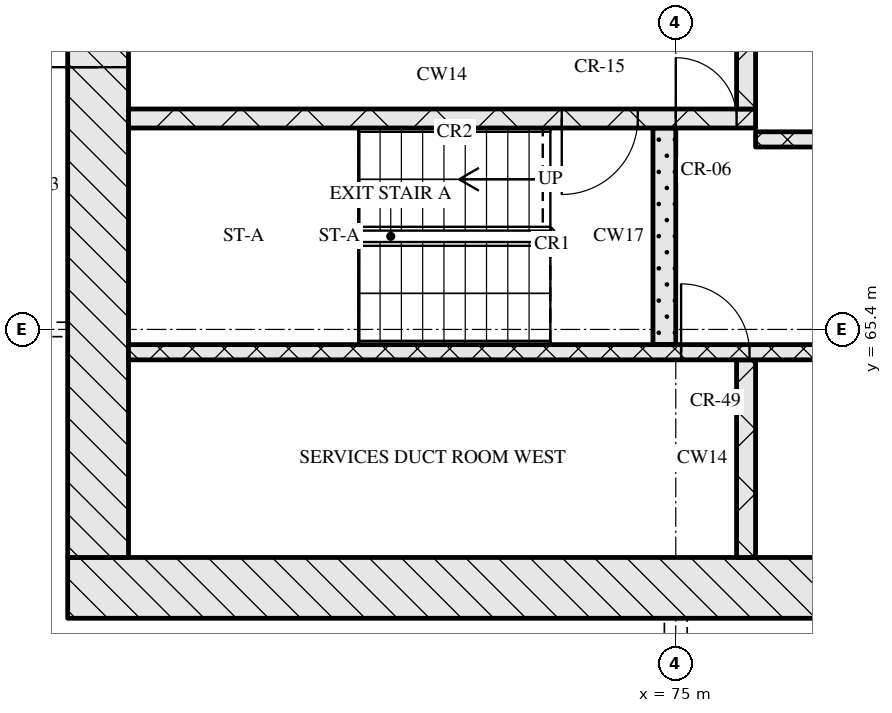
"""IFC4 building model, lengths in metres.
Left out: names, types, materials, properties, quantities, classifications, styles, units other than length and angle.
Written with IfcOpenShell. Run it as: python <this file> out.ifc"""

import sys

from ifc_helpers import new_model, si_unit, direction, frame, frame_2d, origin, place, context, subcontext, project, spatial, rectangle, extrude, element, fill, save


model = new_model("IFC4")
c1 = context("Model", 3, precision=1e-05, world=origin(), true_north=direction((0.0, 1.0)))
c2 = subcontext(c1, "Body", "Model", "MODEL_VIEW")
j1 = project(units=[si_unit("LENGTHUNIT", "METRE"), si_unit("PLANEANGLEUNIT", "RADIAN")], contexts=[c1])
p1 = place(None, origin())
s1 = spatial("IfcSite", under=j1, at=p1, CompositionType="ELEMENT")
p2 = place(p1, origin())
s2 = spatial("IfcBuilding", under=s1, at=p2, CompositionType="ELEMENT")
p3 = place(p2, frame((0.0, 0.0, 154.65)))
s3 = spatial("IfcBuildingStorey", under=s2, at=p3, CompositionType="ELEMENT", Elevation=154.65)
p4 = place(p3, frame((67.0, 62.0, 0.0), z_axis=(0.0, 0.0, 1.0), x_axis=(1.0, 0.0, 0.0)))
e1 = element("IfcWall", 1, at=p4, inside=s3, PredefinedType="SOLIDWALL", context=c2, shape_type="SweptSolid", body=[
    extrude(rectangle(XDim=41.2, YDim=0.8, at=frame_2d((20.6, 0.0))), origin(), (0.0, 0.0, 1.0), 3.32),
])
p5 = place(p4, frame((20.95, 0.0, 0.0)))
e2 = element("IfcOpeningElement", 2, at=p5, cuts=e1, PredefinedType="OPENING", context=c2, shape_type="SweptSolid", body=[
    extrude(rectangle(XDim=1.8, YDim=2.1, at=frame_2d((0.9, 1.05))), frame((0.0, 0.41, 0.0), z_axis=(0.0, -1.0, 0.0), x_axis=(1.0, 0.0, 0.0)), (0.0, 0.0, 1.0), 0.82),
])
p6 = place(p3, frame((67.4, 62.4, 0.0), z_axis=(0.0, 0.0, 1.0), x_axis=(0.0, 1.0, 0.0)))
e3 = element("IfcWall", 3, at=p6, inside=s3, PredefinedType="SOLIDWALL", context=c2, shape_type="SweptSolid", body=[
    extrude(rectangle(XDim=12.0, YDim=0.8, at=frame_2d((6.0, 0.0))), origin(), (0.0, 0.0, 1.0), 3.32),
])
p7 = place(p6, frame((6.45, 0.0, 0.0)))
e4 = element("IfcOpeningElement", 4, at=p7, cuts=e3, PredefinedType="OPENING", context=c2, shape_type="SweptSolid", body=[
    extrude(rectangle(XDim=1.2, YDim=2.1, at=frame_2d((0.6, 1.05))), frame((0.0, 0.41, 0.0), z_axis=(0.0, -1.0, 0.0), x_axis=(1.0, 0.0, 0.0)), (0.0, 0.0, 1.0), 0.82),
])
p8 = place(p3, frame((75.925, 62.4, 0.0), z_axis=(0.0, 0.0, 1.0), x_axis=(0.0, 1.0, 0.0)))
e5 = element("IfcWall", 5, at=p8, inside=s3, PredefinedType="SOLIDWALL", context=c2, shape_type="SweptSolid", body=[
    extrude(rectangle(XDim=2.6, YDim=0.25, at=frame_2d((1.3, 0.0))), origin(), (0.0, 0.0, 1.0), 3.32),
])
p9 = place(p3, frame((67.8, 65.1, 0.0), z_axis=(0.0, 0.0, 1.0), x_axis=(1.0, 0.0, 0.0)))
e6 = element("IfcWall", 6, at=p9, inside=s3, PredefinedType="SOLIDWALL", context=c2, shape_type="SweptSolid", body=[
    extrude(rectangle(XDim=18.5, YDim=0.2, at=frame_2d((9.25, 0.0))), origin(), (0.0, 0.0, 1.0), 3.32),
])
p10 = place(p9, frame((7.27, 0.0, 0.0)))
e7 = element("IfcOpeningElement", 7, at=p10, cuts=e6, PredefinedType="OPENING", context=c2, shape_type="SweptSolid", body=[
    extrude(rectangle(XDim=0.9, YDim=2.1, at=frame_2d((0.45, 1.05))), frame((0.0, 0.11, 0.0), z_axis=(0.0, -1.0, 0.0), x_axis=(1.0, 0.0, 0.0)), (0.0, 0.0, 1.0), 0.22),
])
p11 = place(p9, frame((11.45, 0.0, 0.0)))
e8 = element("IfcOpeningElement", 8, at=p11, cuts=e6, PredefinedType="OPENING", context=c2, shape_type="SweptSolid", body=[
    extrude(rectangle(XDim=0.9, YDim=2.1, at=frame_2d((0.45, 1.05))), frame((0.0, 0.11, 0.0), z_axis=(0.0, -1.0, 0.0), x_axis=(1.0, 0.0, 0.0)), (0.0, 0.0, 1.0), 0.22),
])
p12 = place(p9, frame((16.7, 0.0, 0.0)))
e9 = element("IfcOpeningElement", 9, at=p12, cuts=e6, PredefinedType="OPENING", context=c2, shape_type="SweptSolid", body=[
    extrude(rectangle(XDim=0.9, YDim=2.1, at=frame_2d((0.45, 1.05))), frame((0.0, 0.11, 0.0), z_axis=(0.0, -1.0, 0.0), x_axis=(1.0, 0.0, 0.0)), (0.0, 0.0, 1.0), 0.22),
])
p13 = place(p3, frame((74.85, 65.2, 0.0), z_axis=(0.0, 0.0, 1.0), x_axis=(0.0, 1.0, 0.0)))
e10 = element("IfcWall", 10, at=p13, inside=s3, PredefinedType="SOLIDWALL", context=c2, shape_type="SweptSolid", body=[
    extrude(rectangle(XDim=2.85, YDim=0.3, at=frame_2d((1.425, 0.0))), origin(), (0.0, 0.0, 1.0), 3.32),
])
p14 = place(p3, frame((76.05, 67.9, 0.0), z_axis=(0.0, 0.0, 1.0), x_axis=(1.0, 0.0, 0.0)))
e11 = element("IfcWall", 11, at=p14, inside=s3, PredefinedType="SOLIDWALL", context=c2, shape_type="SweptSolid", body=[
    extrude(rectangle(XDim=23.1, YDim=0.2, at=frame_2d((11.55, 0.0))), origin(), (0.0, 0.0, 1.0), 3.32),
])
p15 = place(p14, frame((1.4, 0.0, 0.0)))
e12 = element("IfcOpeningElement", 12, at=p15, cuts=e11, PredefinedType="OPENING", context=c2, shape_type="SweptSolid", body=[
    extrude(rectangle(XDim=0.9, YDim=2.1, at=frame_2d((0.45, 1.05))), frame((0.0, 0.11, 0.0), z_axis=(0.0, -1.0, 0.0), x_axis=(1.0, 0.0, 0.0)), (0.0, 0.0, 1.0), 0.22),
])
p16 = place(p14, frame((5.11, 0.0, 0.0)))
e13 = element("IfcOpeningElement", 13, at=p16, cuts=e11, PredefinedType="OPENING", context=c2, shape_type="SweptSolid", body=[
    extrude(rectangle(XDim=0.9, YDim=2.1, at=frame_2d((0.45, 1.05))), frame((0.0, 0.11, 0.0), z_axis=(0.0, -1.0, 0.0), x_axis=(1.0, 0.0, 0.0)), (0.0, 0.0, 1.0), 0.22),
])
p17 = place(p14, frame((8.45, 0.0, 0.0)))
e14 = element("IfcOpeningElement", 14, at=p17, cuts=e11, PredefinedType="OPENING", context=c2, shape_type="SweptSolid", body=[
    extrude(rectangle(XDim=0.9, YDim=2.1, at=frame_2d((0.45, 1.05))), frame((0.0, 0.11, 0.0), z_axis=(0.0, -1.0, 0.0), x_axis=(1.0, 0.0, 0.0)), (0.0, 0.0, 1.0), 0.22),
])
p18 = place(p14, frame((10.91, 0.0, 0.0)))
e15 = element("IfcOpeningElement", 15, at=p18, cuts=e11, PredefinedType="OPENING", context=c2, shape_type="SweptSolid", body=[
    extrude(rectangle(XDim=0.9, YDim=2.1, at=frame_2d((0.45, 1.05))), frame((0.0, 0.11, 0.0), z_axis=(0.0, -1.0, 0.0), x_axis=(1.0, 0.0, 0.0)), (0.0, 0.0, 1.0), 0.22),
])
p19 = place(p14, frame((13.55, 0.0, 0.0)))
e16 = element("IfcOpeningElement", 16, at=p19, cuts=e11, PredefinedType="OPENING", context=c2, shape_type="SweptSolid", body=[
    extrude(rectangle(XDim=1.0, YDim=2.1, at=frame_2d((0.5, 1.05))), frame((0.0, 0.11, 0.0), z_axis=(0.0, -1.0, 0.0), x_axis=(1.0, 0.0, 0.0)), (0.0, 0.0, 1.0), 0.22),
])
p20 = place(p14, frame((16.2, 0.0, 0.0)))
e17 = element("IfcOpeningElement", 17, at=p20, cuts=e11, PredefinedType="OPENING", context=c2, shape_type="SweptSolid", body=[
    extrude(rectangle(XDim=1.1, YDim=2.1, at=frame_2d((0.55, 1.05))), frame((0.0, 0.11, 0.0), z_axis=(0.0, -1.0, 0.0), x_axis=(1.0, 0.0, 0.0)), (0.0, 0.0, 1.0), 0.22),
])
p21 = place(p14, frame((18.7, 0.0, 0.0)))
e18 = element("IfcOpeningElement", 18, at=p21, cuts=e11, PredefinedType="OPENING", context=c2, shape_type="SweptSolid", body=[
    extrude(rectangle(XDim=1.1, YDim=2.1, at=frame_2d((0.55, 1.05))), frame((0.0, 0.11, 0.0), z_axis=(0.0, -1.0, 0.0), x_axis=(1.0, 0.0, 0.0)), (0.0, 0.0, 1.0), 0.22),
])
p22 = place(p14, frame((21.2, 0.0, 0.0)))
e19 = element("IfcOpeningElement", 19, at=p22, cuts=e11, PredefinedType="OPENING", context=c2, shape_type="SweptSolid", body=[
    extrude(rectangle(XDim=1.1, YDim=2.1, at=frame_2d((0.55, 1.05))), frame((0.0, 0.11, 0.0), z_axis=(0.0, -1.0, 0.0), x_axis=(1.0, 0.0, 0.0)), (0.0, 0.0, 1.0), 0.22),
])
p23 = place(p3, frame((67.8, 68.175, 0.0), z_axis=(0.0, 0.0, 1.0), x_axis=(1.0, 0.0, 0.0)))
e20 = element("IfcWall", 20, at=p23, inside=s3, PredefinedType="SOLIDWALL", context=c2, shape_type="SweptSolid", body=[
    extrude(rectangle(XDim=8.25, YDim=0.25, at=frame_2d((4.125, 0.0))), origin(), (0.0, 0.0, 1.0), 3.32),
])
p24 = place(p23, frame((5.7, 0.0, 0.0)))
e21 = element("IfcOpeningElement", 21, at=p24, cuts=e20, PredefinedType="OPENING", context=c2, shape_type="SweptSolid", body=[
    extrude(rectangle(XDim=1.0, YDim=2.1, at=frame_2d((0.5, 1.05))), frame((0.0, 0.135, 0.0), z_axis=(0.0, -1.0, 0.0), x_axis=(1.0, 0.0, 0.0)), (0.0, 0.0, 1.0), 0.27),
])
p25 = place(p23, frame((7.2, 0.0, 0.0)))
e22 = element("IfcOpeningElement", 22, at=p25, cuts=e20, PredefinedType="OPENING", context=c2, shape_type="SweptSolid", body=[
    extrude(rectangle(XDim=0.8, YDim=2.1, at=frame_2d((0.4, 1.05))), frame((0.0, 0.135, 0.0), z_axis=(0.0, -1.0, 0.0), x_axis=(1.0, 0.0, 0.0)), (0.0, 0.0, 1.0), 0.27),
])
p26 = place(p3, frame((75.925, 68.3, 0.0), z_axis=(0.0, 0.0, 1.0), x_axis=(0.0, 1.0, 0.0)))
e23 = element("IfcWall", 23, at=p26, inside=s3, PredefinedType="SOLIDWALL", context=c2, shape_type="SweptSolid", body=[
    extrude(rectangle(XDim=2.3, YDim=0.25, at=frame_2d((1.15, 0.0))), origin(), (0.0, 0.0, 1.0), 3.32),
])
p27 = place(p10, origin())
e24 = element("IfcDoor", 24, at=p27, inside=s3, OperationType="SINGLE_SWING_LEFT", PredefinedType="DOOR", context=c2, shape_type="SweptSolid", body=[
    extrude(rectangle(XDim=0.9, YDim=2.1, at=frame_2d((0.45, 1.05))), frame((0.0, 0.025, 0.0), z_axis=(0.0, -1.0, 0.0), x_axis=(1.0, 0.0, 0.0)), (0.0, 0.0, 1.0), 0.05),
])
fill(e7, e24)
p28 = place(p24, origin())
e25 = element("IfcDoor", 25, at=p28, inside=s3, OperationType="SINGLE_SWING_RIGHT", PredefinedType="DOOR", context=c2, shape_type="SweptSolid", body=[
    extrude(rectangle(XDim=1.0, YDim=2.1, at=frame_2d((0.5, 1.05))), frame((0.0, 0.025, 0.0), z_axis=(0.0, -1.0, 0.0), x_axis=(1.0, 0.0, 0.0)), (0.0, 0.0, 1.0), 0.05),
])
fill(e21, e25)
p29 = place(p25, origin())
e26 = element("IfcDoor", 26, at=p29, inside=s3, OperationType="SINGLE_SWING_LEFT", PredefinedType="DOOR", context=c2, shape_type="SweptSolid", body=[
    extrude(rectangle(XDim=0.8, YDim=2.1, at=frame_2d((0.4, 1.05))), frame((0.0, 0.025, 0.0), z_axis=(0.0, -1.0, 0.0), x_axis=(1.0, 0.0, 0.0)), (0.0, 0.0, 1.0), 0.05),
])
fill(e22, e26)
p30 = place(p7, origin())
e27 = element("IfcDoor", 27, at=p30, inside=s3, OperationType="SINGLE_SWING_LEFT", PredefinedType="DOOR", context=c2, shape_type="SweptSolid", body=[
    extrude(rectangle(XDim=1.2, YDim=2.1, at=frame_2d((0.6, 1.05))), frame((0.0, 0.025, 0.0), z_axis=(0.0, -1.0, 0.0), x_axis=(1.0, 0.0, 0.0)), (0.0, 0.0, 1.0), 0.05),
])
fill(e4, e27)
save(model, sys.argv[1])
